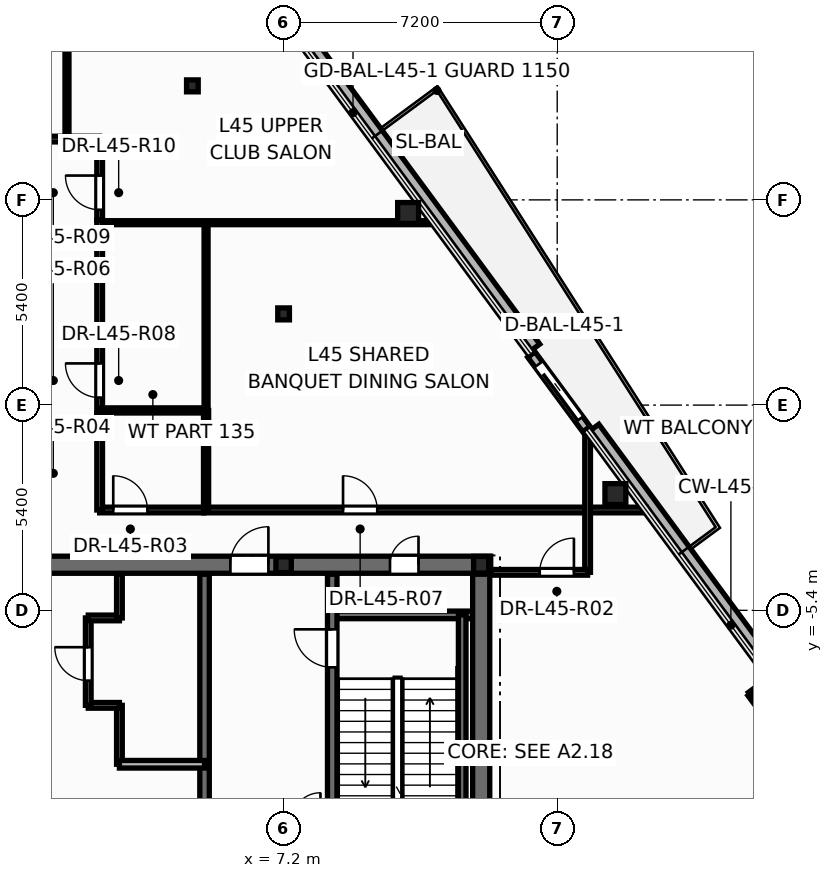
"""IFC4 building model, lengths in metres.
Left out: names, types, materials, properties, quantities, classifications, styles, units other than length and angle.
Written with IfcOpenShell. Run it as: python <this file> out.ifc"""

import sys

from ifc_helpers import new_model, si_unit, direction, frame, frame_2d, origin, origin_2d, place, context, subcontext, project, spatial, rectangle, hollow_circle, i_section, extrude, element, fill, save


model = new_model("IFC4")
c1 = context("Model", 3, precision=1e-05, world=origin(), true_north=direction((0.0, 1.0)))
c2 = subcontext(c1, "Body", "Model", "MODEL_VIEW")
j1 = project(units=[si_unit("LENGTHUNIT", "METRE"), si_unit("PLANEANGLEUNIT", "RADIAN")], contexts=[c1])
p1 = place(None, origin())
s1 = spatial("IfcSite", under=j1, at=p1, CompositionType="ELEMENT")
p2 = place(p1, origin())
s2 = spatial("IfcBuilding", under=s1, at=p2, CompositionType="ELEMENT")
p3 = place(p2, frame((0.0, 0.0, 173.7)))
s3 = spatial("IfcBuildingStorey", under=s2, at=p3, CompositionType="ELEMENT", Elevation=173.7)
for number, where, z_axis, x_axis in (
    (1, (15.931, -2.341, 0.0), (0.0, 0.0, 1.0), (1.0, 0.0, 0.0)),
    (2, (10.477, 5.055, 0.0), (0.0, 0.0, 1.0), (1.0, 0.0, 0.0)),
):
    element("IfcColumn", number, at=place(p3, frame(where, z_axis=z_axis, x_axis=x_axis)), inside=s3, PredefinedType="COLUMN", context=c2, shape_type="SweptSolid", body=[
        extrude(hollow_circle(Radius=0.275, WallThickness=0.024, at=origin_2d()), origin(), (0.0, 0.0, 1.0), 4.8),
    ])
p4 = place(p3, frame((12.4, -4.2, 0.0), z_axis=(0.0, 0.0, 1.0), x_axis=(1.0, 0.0, 0.0)))
e3 = element("IfcColumn", 3, at=p4, inside=s3, PredefinedType="COLUMN", context=c2, shape_type="SweptSolid", body=[
    extrude(i_section(OverallWidth=0.4, OverallDepth=0.44, WebThickness=0.028, FlangeThickness=0.04, at=origin_2d()), origin(), (0.0, 0.0, 1.0), 4.8),
])
p5 = place(p3, frame((7.2, -4.2, 0.0), z_axis=(0.0, 0.0, 1.0), x_axis=(1.0, 0.0, 0.0)))
e4 = element("IfcColumn", 4, at=p5, inside=s3, PredefinedType="PILASTER", context=c2, shape_type="SweptSolid", body=[
    extrude(i_section(OverallWidth=0.405, OverallDepth=0.414, WebThickness=0.022, FlangeThickness=0.032, at=origin_2d()), origin(), (0.0, 0.0, 1.0), 4.8),
])
for number, where, z_axis, x_axis in (
    (5, (7.2, 2.4, 0.0), (0.0, 0.0, 1.0), (1.0, 0.0, 0.0)),
    (6, (4.8, 8.4, 0.0), (0.0, 0.0, 1.0), (1.0, 0.0, 0.0)),
):
    element("IfcColumn", number, at=place(p3, frame(where, z_axis=z_axis, x_axis=x_axis)), inside=s3, PredefinedType="COLUMN", context=c2, shape_type="SweptSolid", body=[
        extrude(i_section(OverallWidth=0.307, OverallDepth=0.314, WebThickness=0.012, FlangeThickness=0.019, at=origin_2d()), origin(), (0.0, 0.0, 1.0), 4.8),
    ])
p6 = place(p3, frame((22.848, -10.779, -0.2), z_axis=(0.0, 0.0, 1.0), x_axis=(-0.593477838776, 0.804850330734, 0.0)))
e7 = element("IfcWall", 7, at=p6, inside=s3, PredefinedType="PARAPET", context=c2, shape_type="SweptSolid", body=[
    extrude(rectangle(XDim=12.634, YDim=0.36, at=frame_2d((6.317, 0.0))), origin(), (0.0, 0.0, 1.0), 0.38),
])
p7 = place(p3, frame((13.795, 1.498, -0.2), z_axis=(0.0, 0.0, 1.0), x_axis=(-0.593484495124, 0.804845422455, 0.0)))
e8 = element("IfcWall", 8, at=p7, inside=s3, PredefinedType="PARAPET", context=c2, shape_type="SweptSolid", body=[
    extrude(rectangle(XDim=15.635, YDim=0.36, at=frame_2d((7.818, 0.0))), origin(), (0.0, 0.0, 1.0), 0.38),
])
p8 = place(p3, frame((15.168, -0.633, -0.015), z_axis=(0.0, 0.0, 1.0), x_axis=(-0.593448168385, 0.804872208142, 0.0)))
e9 = element("IfcWall", 9, at=p8, inside=s3, PredefinedType="STANDARD", context=c2, shape_type="SweptSolid", body=[
    extrude(rectangle(XDim=2.44, YDim=0.24, at=frame_2d((1.22, 0.0))), origin(), (0.0, 0.0, 1.0), 4.007),
])
p9 = place(p8, frame((0.32, 0.0, 0.015)))
e10 = element("IfcOpeningElement", 10, at=p9, cuts=e9, PredefinedType="OPENING", context=c2, shape_type="SweptSolid", body=[
    extrude(rectangle(XDim=1.806, YDim=2.204, at=frame_2d((0.9, 1.102))), frame((0.0, 0.13, 0.0), z_axis=(0.0, -1.0, 0.0), x_axis=(1.0, 0.0, 0.0)), (0.0, 0.0, 1.0), 0.26),
])
p10 = place(p3, frame((2.88, -9.45, 0.0), z_axis=(0.0, 0.0, 1.0), x_axis=(0.0, 1.0, 0.0)))
e11 = element("IfcWall", 11, at=p10, inside=s3, PredefinedType="PARTITIONING", context=c2, shape_type="SweptSolid", body=[
    extrude(rectangle(XDim=1.55, YDim=0.15, at=frame_2d((0.775, 0.0))), origin(), (0.0, 0.0, 1.0), 4.55),
])
p11 = place(p3, frame((2.06, -7.9, 0.0), z_axis=(0.0, 0.0, 1.0), x_axis=(1.0, 0.0, 0.0)))
e12 = element("IfcWall", 12, at=p11, inside=s3, PredefinedType="PARTITIONING", context=c2, shape_type="SweptSolid", body=[
    extrude(rectangle(XDim=0.82, YDim=0.15, at=frame_2d((0.41, 0.0))), origin(), (0.0, 0.0, 1.0), 4.55),
])
p12 = place(p3, frame((2.06, -7.9, 0.0), z_axis=(0.0, 0.0, 1.0), x_axis=(0.0, 1.0, 0.0)))
e13 = element("IfcWall", 13, at=p12, inside=s3, PredefinedType="PARTITIONING", context=c2, shape_type="SweptSolid", body=[
    extrude(rectangle(XDim=2.3, YDim=0.15, at=frame_2d((1.15, 0.0))), origin(), (0.0, 0.0, 1.0), 4.55),
])
p13 = place(p12, frame((0.65, 0.0, 0.0)))
e14 = element("IfcOpeningElement", 14, at=p13, cuts=e13, PredefinedType="OPENING", context=c2, shape_type="SweptSolid", body=[
    extrude(rectangle(XDim=0.886, YDim=2.104, at=frame_2d((0.44, 1.052))), frame((0.0, 0.085, 0.0), z_axis=(0.0, -1.0, 0.0), x_axis=(1.0, 0.0, 0.0)), (0.0, 0.0, 1.0), 0.17),
])
p14 = place(p3, frame((2.06, -5.6, 0.0), z_axis=(0.0, 0.0, 1.0), x_axis=(1.0, 0.0, 0.0)))
e15 = element("IfcWall", 15, at=p14, inside=s3, PredefinedType="PARTITIONING", context=c2, shape_type="SweptSolid", body=[
    extrude(rectangle(XDim=0.82, YDim=0.15, at=frame_2d((0.41, 0.0))), origin(), (0.0, 0.0, 1.0), 4.55),
])
p15 = place(p3, frame((2.88, -5.6, 0.0), z_axis=(0.0, 0.0, 1.0), x_axis=(0.0, 1.0, 0.0)))
e16 = element("IfcWall", 16, at=p15, inside=s3, PredefinedType="PARTITIONING", context=c2, shape_type="SweptSolid", body=[
    extrude(rectangle(XDim=1.15, YDim=0.15, at=frame_2d((0.575, 0.0))), origin(), (0.0, 0.0, 1.0), 4.55),
])
p16 = place(p3, frame((-12.65, -4.2, 0.0), z_axis=(0.0, 0.0, 1.0), x_axis=(1.0, 0.0, 0.0)))
e17 = element("IfcWall", 17, at=p16, inside=s3, PredefinedType="SHEAR", context=c2, shape_type="SweptSolid", body=[
    extrude(rectangle(XDim=25.3, YDim=0.45, at=frame_2d((12.65, 0.0))), origin(), (0.0, 0.0, 1.0), 4.8),
])
p17 = place(p16, frame((1.85, 0.0, 0.0)))
e18 = element("IfcOpeningElement", 18, at=p17, cuts=e17, PredefinedType="OPENING", context=c2, shape_type="SweptSolid", body=[
    extrude(rectangle(XDim=0.756, YDim=2.054, at=frame_2d((0.375, 1.027))), frame((0.0, 0.235, 0.0), z_axis=(0.0, -1.0, 0.0), x_axis=(1.0, 0.0, 0.0)), (0.0, 0.0, 1.0), 0.47),
])
p18 = place(p16, frame((22.65, 0.0, 0.0)))
e19 = element("IfcOpeningElement", 19, at=p18, cuts=e17, PredefinedType="OPENING", context=c2, shape_type="SweptSolid", body=[
    extrude(rectangle(XDim=0.756, YDim=2.054, at=frame_2d((0.375, 1.027))), frame((0.0, 0.235, 0.0), z_axis=(0.0, -1.0, 0.0), x_axis=(1.0, 0.0, 0.0)), (0.0, 0.0, 1.0), 0.47),
])
p19 = place(p16, frame((5.85, 0.0, 0.0)))
e20 = element("IfcOpeningElement", 20, at=p19, cuts=e17, PredefinedType="OPENING", context=c2, shape_type="SweptSolid", body=[
    extrude(rectangle(XDim=1.006, YDim=2.104, at=frame_2d((0.5, 1.052))), frame((0.0, 0.235, 0.0), z_axis=(0.0, -1.0, 0.0), x_axis=(1.0, 0.0, 0.0)), (0.0, 0.0, 1.0), 0.47),
])
p20 = place(p16, frame((10.35, 0.0, 0.0)))
e21 = element("IfcOpeningElement", 21, at=p20, cuts=e17, PredefinedType="OPENING", context=c2, shape_type="SweptSolid", body=[
    extrude(rectangle(XDim=1.406, YDim=2.154, at=frame_2d((0.7, 1.077))), frame((0.0, 0.235, 0.0), z_axis=(0.0, -1.0, 0.0), x_axis=(1.0, 0.0, 0.0)), (0.0, 0.0, 1.0), 0.47),
])
p21 = place(p16, frame((18.45, 0.0, 0.0)))
e22 = element("IfcOpeningElement", 22, at=p21, cuts=e17, PredefinedType="OPENING", context=c2, shape_type="SweptSolid", body=[
    extrude(rectangle(XDim=1.006, YDim=2.104, at=frame_2d((0.5, 1.052))), frame((0.0, 0.235, 0.0), z_axis=(0.0, -1.0, 0.0), x_axis=(1.0, 0.0, 0.0)), (0.0, 0.0, 1.0), 0.47),
])
p22 = place(p3, frame((8.48, -5.52, 0.0), z_axis=(0.0, 0.0, 1.0), x_axis=(1.0, 0.0, 0.0)))
e23 = element("IfcWall", 23, at=p22, inside=s3, PredefinedType="SOLIDWALL", context=c2, shape_type="SweptSolid", body=[
    extrude(rectangle(XDim=3.87, YDim=0.2, at=frame_2d((1.935, 0.0))), origin(), (0.0, 0.0, 1.0), 4.8),
])
p23 = place(p3, frame((11.9, -13.1, 0.0), z_axis=(0.0, 0.0, 1.0), x_axis=(0.0, 1.0, 0.0)))
e24 = element("IfcWall", 24, at=p23, inside=s3, PredefinedType="SOLIDWALL", context=c2, shape_type="SweptSolid", body=[
    extrude(rectangle(XDim=7.58, YDim=0.2, at=frame_2d((3.79, 0.0))), origin(), (0.0, 0.0, 1.0), 4.8),
])
p24 = place(p3, frame((8.48, -13.85, 0.0), z_axis=(0.0, 0.0, 1.0), x_axis=(0.0, 1.0, 0.0)))
e25 = element("IfcWall", 25, at=p24, inside=s3, PredefinedType="SHEAR", context=c2, shape_type="SweptSolid", body=[
    extrude(rectangle(XDim=9.4, YDim=0.25, at=frame_2d((4.7, 0.0))), origin(), (0.0, 0.0, 1.0), 4.8),
])
p25 = place(p24, frame((6.95, 0.0, 0.0)))
e26 = element("IfcOpeningElement", 26, at=p25, cuts=e25, PredefinedType="OPENING", context=c2, shape_type="SweptSolid", body=[
    extrude(rectangle(XDim=1.006, YDim=2.104, at=frame_2d((0.5, 1.052))), frame((0.0, 0.135, 0.0), z_axis=(0.0, -1.0, 0.0), x_axis=(1.0, 0.0, 0.0)), (0.0, 0.0, 1.0), 0.27),
])
p26 = place(p3, frame((5.12, -13.85, 0.0), z_axis=(0.0, 0.0, 1.0), x_axis=(0.0, 1.0, 0.0)))
e27 = element("IfcWall", 27, at=p26, inside=s3, PredefinedType="SHEAR", context=c2, shape_type="SweptSolid", body=[
    extrude(rectangle(XDim=9.4, YDim=0.25, at=frame_2d((4.7, 0.0))), origin(), (0.0, 0.0, 1.0), 4.8),
])
p27 = place(p3, frame((12.4, -13.85, 0.0), z_axis=(0.0, 0.0, 1.0), x_axis=(0.0, 1.0, 0.0)))
e28 = element("IfcWall", 28, at=p27, inside=s3, PredefinedType="SHEAR", context=c2, shape_type="SweptSolid", body=[
    extrude(rectangle(XDim=9.4, YDim=0.45, at=frame_2d((4.7, 0.0))), origin(), (0.0, 0.0, 1.0), 4.8),
])
p28 = place(p3, frame((2.88, -9.45, 0.0), z_axis=(0.0, 0.0, 1.0), x_axis=(1.0, 0.0, 0.0)))
e29 = element("IfcWall", 29, at=p28, inside=s3, PredefinedType="SOLIDWALL", context=c2, shape_type="SweptSolid", body=[
    extrude(rectangle(XDim=2.24, YDim=0.2, at=frame_2d((1.12, 0.0))), origin(), (0.0, 0.0, 1.0), 4.55),
])
p29 = place(p3, frame((5.1, -2.76, 0.0), z_axis=(0.0, 0.0, 1.0), x_axis=(1.0, 0.0, 0.0)))
e30 = element("IfcWall", 30, at=p29, inside=s3, PredefinedType="PARTITIONING", context=c2, shape_type="SweptSolid", body=[
    extrude(rectangle(XDim=11.636, YDim=0.15, at=frame_2d((5.818, 0.0))), origin(), (0.0, 0.0, 1.0), 3.525),
])
p30 = place(p29, frame((3.664, 0.0, 0.0)))
e31 = element("IfcOpeningElement", 31, at=p30, cuts=e30, PredefinedType="OPENING", context=c2, shape_type="SweptSolid", body=[
    extrude(rectangle(XDim=0.906, YDim=2.104, at=frame_2d((0.45, 1.052))), frame((0.0, 0.085, 0.0), z_axis=(0.0, -1.0, 0.0), x_axis=(1.0, 0.0, 0.0)), (0.0, 0.0, 1.0), 0.17),
])
p31 = place(p3, frame((1.5, 7.0, 0.0), z_axis=(0.0, 0.0, 1.0), x_axis=(0.0, 1.0, 0.0)))
e32 = element("IfcWall", 32, at=p31, inside=s3, PredefinedType="PARTITIONING", context=c2, shape_type="SweptSolid", body=[
    extrude(rectangle(XDim=7.083, YDim=0.105, at=frame_2d((3.542, 0.0))), origin(), (0.0, 0.0, 1.0), 3.825),
])
p32 = place(p3, frame((2.36, 4.8, 0.0), z_axis=(0.0, 0.0, 1.0), x_axis=(1.0, 0.0, 0.0)))
e33 = element("IfcWall", 33, at=p32, inside=s3, PredefinedType="PARTITIONING", context=c2, shape_type="SweptSolid", body=[
    extrude(rectangle(XDim=8.802, YDim=0.105, at=frame_2d((4.401, 0.0))), origin(), (0.0, 0.0, 1.0), 3.825),
])
p33 = place(p3, frame((2.36, -0.2, 0.0), z_axis=(0.0, 0.0, 1.0), x_axis=(0.0, 1.0, 0.0)))
e34 = element("IfcWall", 34, at=p33, inside=s3, PredefinedType="PARTITIONING", context=c2, shape_type="SweptSolid", body=[
    extrude(rectangle(XDim=5.06, YDim=0.15, at=frame_2d((2.53, 0.0))), origin(), (0.0, 0.0, 1.0), 3.525),
])
p34 = place(p33, frame((0.397, 0.0, 0.0)))
e35 = element("IfcOpeningElement", 35, at=p34, cuts=e34, PredefinedType="OPENING", context=c2, shape_type="SweptSolid", body=[
    extrude(rectangle(XDim=0.906, YDim=2.104, at=frame_2d((0.45, 1.052))), frame((0.0, 0.085, 0.0), z_axis=(0.0, -1.0, 0.0), x_axis=(1.0, 0.0, 0.0)), (0.0, 0.0, 1.0), 0.17),
])
p35 = place(p3, frame((5.16, -0.2, 0.0), z_axis=(0.0, 0.0, 1.0), x_axis=(0.0, 1.0, 0.0)))
e36 = element("IfcWall", 36, at=p35, inside=s3, PredefinedType="PARTITIONING", context=c2, shape_type="SweptSolid", body=[
    extrude(rectangle(XDim=5.0, YDim=0.105, at=frame_2d((2.5, 0.0))), origin(), (0.0, 0.0, 1.0), 3.525),
])
p36 = place(p3, frame((15.2, -4.4, 0.0), z_axis=(0.0, 0.0, 1.0), x_axis=(0.0, 1.0, 0.0)))
e37 = element("IfcWall", 37, at=p36, inside=s3, PredefinedType="PARTITIONING", context=c2, shape_type="SweptSolid", body=[
    extrude(rectangle(XDim=3.724, YDim=0.15, at=frame_2d((1.862, 0.0))), origin(), (0.0, 0.0, 1.0), 3.825),
])
p37 = place(p3, frame((2.36, -2.76, 0.0), z_axis=(0.0, 0.0, 1.0), x_axis=(1.0, 0.0, 0.0)))
e38 = element("IfcWall", 38, at=p37, inside=s3, PredefinedType="PARTITIONING", context=c2, shape_type="SweptSolid", body=[
    extrude(rectangle(XDim=2.738, YDim=0.15, at=frame_2d((1.369, 0.0))), origin(), (0.0, 0.0, 1.0), 4.169),
])
p38 = place(p37, frame((0.357, 0.0, 0.0)))
e39 = element("IfcOpeningElement", 39, at=p38, cuts=e38, PredefinedType="OPENING", context=c2, shape_type="SweptSolid", body=[
    extrude(rectangle(XDim=0.906, YDim=2.104, at=frame_2d((0.45, 1.052))), frame((0.0, 0.085, 0.0), z_axis=(0.0, -1.0, 0.0), x_axis=(1.0, 0.0, 0.0)), (0.0, 0.0, 1.0), 0.17),
])
p39 = place(p3, frame((2.36, -0.14, 0.0), z_axis=(0.0, 0.0, 1.0), x_axis=(1.0, 0.0, 0.0)))
e40 = element("IfcWall", 40, at=p39, inside=s3, PredefinedType="PARTITIONING", context=c2, shape_type="SweptSolid", body=[
    extrude(rectangle(XDim=2.8, YDim=0.135, at=frame_2d((1.4, 0.0))), origin(), (0.0, 0.0, 1.0), 4.169),
])
p40 = place(p3, frame((12.652, -4.4, 0.0), z_axis=(0.0, 0.0, 1.0), x_axis=(1.0, 0.0, 0.0)))
e41 = element("IfcWall", 41, at=p40, inside=s3, PredefinedType="PARTITIONING", context=c2, shape_type="SweptSolid", body=[
    extrude(rectangle(XDim=2.548, YDim=0.15, at=frame_2d((1.274, 0.0))), origin(), (0.0, 0.0, 1.0), 3.525),
])
p41 = place(p40, frame((1.288, 0.0, 0.0)))
e42 = element("IfcOpeningElement", 42, at=p41, cuts=e41, PredefinedType="OPENING", context=c2, shape_type="SweptSolid", body=[
    extrude(rectangle(XDim=0.906, YDim=2.104, at=frame_2d((0.45, 1.052))), frame((0.0, 0.085, 0.0), z_axis=(0.0, -1.0, 0.0), x_axis=(1.0, 0.0, 0.0)), (0.0, 0.0, 1.0), 0.17),
])
p42 = place(p3, frame((2.36, -2.76, 0.0), z_axis=(0.0, 0.0, 1.0), x_axis=(0.0, 1.0, 0.0)))
e43 = element("IfcWall", 43, at=p42, inside=s3, PredefinedType="PARTITIONING", context=c2, shape_type="SweptSolid", body=[
    extrude(rectangle(XDim=2.558, YDim=0.15, at=frame_2d((1.279, 0.0))), origin(), (0.0, 0.0, 1.0), 4.55),
])
p43 = place(p3, frame((5.16, -2.76, 0.0), z_axis=(0.0, 0.0, 1.0), x_axis=(0.0, 1.0, 0.0)))
e44 = element("IfcWall", 44, at=p43, inside=s3, PredefinedType="PARTITIONING", context=c2, shape_type="SweptSolid", body=[
    extrude(rectangle(XDim=2.62, YDim=0.135, at=frame_2d((1.31, 0.0))), origin(), (0.0, 0.0, 1.0), 4.55),
])
p44 = place(p3, frame((2.36, 4.862, 0.0), z_axis=(0.0, 0.0, 1.0), x_axis=(0.0, 1.0, 0.0)))
e45 = element("IfcWall", 45, at=p44, inside=s3, PredefinedType="PARTITIONING", context=c2, shape_type="SweptSolid", body=[
    extrude(rectangle(XDim=2.138, YDim=0.15, at=frame_2d((1.069, 0.0))), origin(), (0.0, 0.0, 1.0), 4.169),
])
p45 = place(p44, frame((0.278, 0.0, 0.0)))
e46 = element("IfcOpeningElement", 46, at=p45, cuts=e45, PredefinedType="OPENING", context=c2, shape_type="SweptSolid", body=[
    extrude(rectangle(XDim=0.906, YDim=2.104, at=frame_2d((0.45, 1.052))), frame((0.0, 0.085, 0.0), z_axis=(0.0, -1.0, 0.0), x_axis=(1.0, 0.0, 0.0)), (0.0, 0.0, 1.0), 0.17),
])
p46 = place(p3, frame((20.909, -9.564, 0.0), z_axis=(0.0, 0.0, 1.0), x_axis=(-0.593469747426, 0.804856297043, 0.0)))
e47 = element("IfcWall", 47, at=p46, inside=s3, PredefinedType="PARTITIONING", context=c2, shape_type="SweptSolid", body=[
    extrude(rectangle(XDim=2.43, YDim=0.12, at=frame_2d((1.215, 0.0))), origin(), (0.0, 0.0, 1.0), 4.55),
])
p47 = place(p3, frame((0.64, 7.0, 0.0), z_axis=(0.0, 0.0, 1.0), x_axis=(1.0, 0.0, 0.0)))
e48 = element("IfcWall", 48, at=p47, inside=s3, PredefinedType="PARTITIONING", context=c2, shape_type="SweptSolid", body=[
    extrude(rectangle(XDim=1.72, YDim=0.15, at=frame_2d((0.86, 0.0))), origin(), (0.0, 0.0, 1.0), 4.169),
])
p48 = place(p3, frame((19.467, -7.608, 0.0), z_axis=(0.0, 0.0, 1.0), x_axis=(0.805000876682, 0.593273620298, 0.0)))
e49 = element("IfcWall", 49, at=p48, inside=s3, PredefinedType="PARTITIONING", context=c2, shape_type="SweptSolid", body=[
    extrude(rectangle(XDim=0.67, YDim=0.12, at=frame_2d((0.335, 0.0))), origin(), (0.0, 0.0, 1.0), 3.992),
])
p49 = place(p9, origin())
e50 = element("IfcDoor", 50, at=p49, inside=s3, OperationType="SLIDING_TO_LEFT", PredefinedType="DOOR", context=c2, shape_type="SweptSolid", body=[
    extrude(rectangle(XDim=1.8, YDim=2.2, at=frame_2d((0.9, 1.1))), frame((0.0, 0.025, 0.0), z_axis=(0.0, -1.0, 0.0), x_axis=(1.0, 0.0, 0.0)), (0.0, 0.0, 1.0), 0.05),
])
fill(e10, e50)
p50 = place(p13, origin())
e51 = element("IfcDoor", 51, at=p50, inside=s3, OperationType="SINGLE_SWING_RIGHT", PredefinedType="DOOR", context=c2, shape_type="SweptSolid", body=[
    extrude(rectangle(XDim=0.88, YDim=2.1, at=frame_2d((0.44, 1.05))), frame((0.0, 0.025, 0.0), z_axis=(0.0, -1.0, 0.0), x_axis=(1.0, 0.0, 0.0)), (0.0, 0.0, 1.0), 0.05),
])
fill(e14, e51)
p51 = place(p25, origin())
e52 = element("IfcDoor", 52, at=p51, inside=s3, OperationType="SINGLE_SWING_RIGHT", PredefinedType="DOOR", context=c2, shape_type="SweptSolid", body=[
    extrude(rectangle(XDim=1.0, YDim=2.1, at=frame_2d((0.5, 1.05))), frame((0.0, 0.025, 0.0), z_axis=(0.0, -1.0, 0.0), x_axis=(1.0, 0.0, 0.0)), (0.0, 0.0, 1.0), 0.05),
])
fill(e26, e52)
p52 = place(p18, origin())
e53 = element("IfcDoor", 53, at=p52, inside=s3, OperationType="SINGLE_SWING_RIGHT", PredefinedType="DOOR", context=c2, shape_type="SweptSolid", body=[
    extrude(rectangle(XDim=0.75, YDim=2.05, at=frame_2d((0.375, 1.025))), frame((0.0, 0.025, 0.0), z_axis=(0.0, -1.0, 0.0), x_axis=(1.0, 0.0, 0.0)), (0.0, 0.0, 1.0), 0.05),
])
fill(e19, e53)
p53 = place(p21, origin())
e54 = element("IfcDoor", 54, at=p53, inside=s3, OperationType="SINGLE_SWING_RIGHT", PredefinedType="DOOR", context=c2, shape_type="SweptSolid", body=[
    extrude(rectangle(XDim=1.0, YDim=2.1, at=frame_2d((0.5, 1.05))), frame((0.0, 0.025, 0.0), z_axis=(0.0, -1.0, 0.0), x_axis=(1.0, 0.0, 0.0)), (0.0, 0.0, 1.0), 0.05),
])
fill(e22, e54)
p54 = place(p41, origin())
e55 = element("IfcDoor", 55, at=p54, inside=s3, OperationType="SINGLE_SWING_RIGHT", PredefinedType="DOOR", context=c2, shape_type="SweptSolid", body=[
    extrude(rectangle(XDim=0.9, YDim=2.1, at=frame_2d((0.45, 1.05))), frame((0.0, 0.025, 0.0), z_axis=(0.0, -1.0, 0.0), x_axis=(1.0, 0.0, 0.0)), (0.0, 0.0, 1.0), 0.05),
])
fill(e42, e55)
p55 = place(p38, origin())
e56 = element("IfcDoor", 56, at=p55, inside=s3, OperationType="SINGLE_SWING_LEFT", PredefinedType="DOOR", context=c2, shape_type="SweptSolid", body=[
    extrude(rectangle(XDim=0.9, YDim=2.1, at=frame_2d((0.45, 1.05))), frame((0.0, 0.025, 0.0), z_axis=(0.0, -1.0, 0.0), x_axis=(1.0, 0.0, 0.0)), (0.0, 0.0, 1.0), 0.05),
])
fill(e39, e56)
p56 = place(p30, origin())
e57 = element("IfcDoor", 57, at=p56, inside=s3, OperationType="SINGLE_SWING_LEFT", PredefinedType="DOOR", context=c2, shape_type="SweptSolid", body=[
    extrude(rectangle(XDim=0.9, YDim=2.1, at=frame_2d((0.45, 1.05))), frame((0.0, 0.025, 0.0), z_axis=(0.0, -1.0, 0.0), x_axis=(1.0, 0.0, 0.0)), (0.0, 0.0, 1.0), 0.05),
])
fill(e31, e57)
p57 = place(p34, origin())
e58 = element("IfcDoor", 58, at=p57, inside=s3, OperationType="SINGLE_SWING_RIGHT", PredefinedType="DOOR", context=c2, shape_type="SweptSolid", body=[
    extrude(rectangle(XDim=0.9, YDim=2.1, at=frame_2d((0.45, 1.05))), frame((0.0, 0.025, 0.0), z_axis=(0.0, -1.0, 0.0), x_axis=(1.0, 0.0, 0.0)), (0.0, 0.0, 1.0), 0.05),
])
fill(e35, e58)
p58 = place(p45, origin())
e59 = element("IfcDoor", 59, at=p58, inside=s3, OperationType="SINGLE_SWING_RIGHT", PredefinedType="DOOR", context=c2, shape_type="SweptSolid", body=[
    extrude(rectangle(XDim=0.9, YDim=2.1, at=frame_2d((0.45, 1.05))), frame((0.0, 0.025, 0.0), z_axis=(0.0, -1.0, 0.0), x_axis=(1.0, 0.0, 0.0)), (0.0, 0.0, 1.0), 0.05),
])
fill(e46, e59)
save(model, sys.argv[1])
